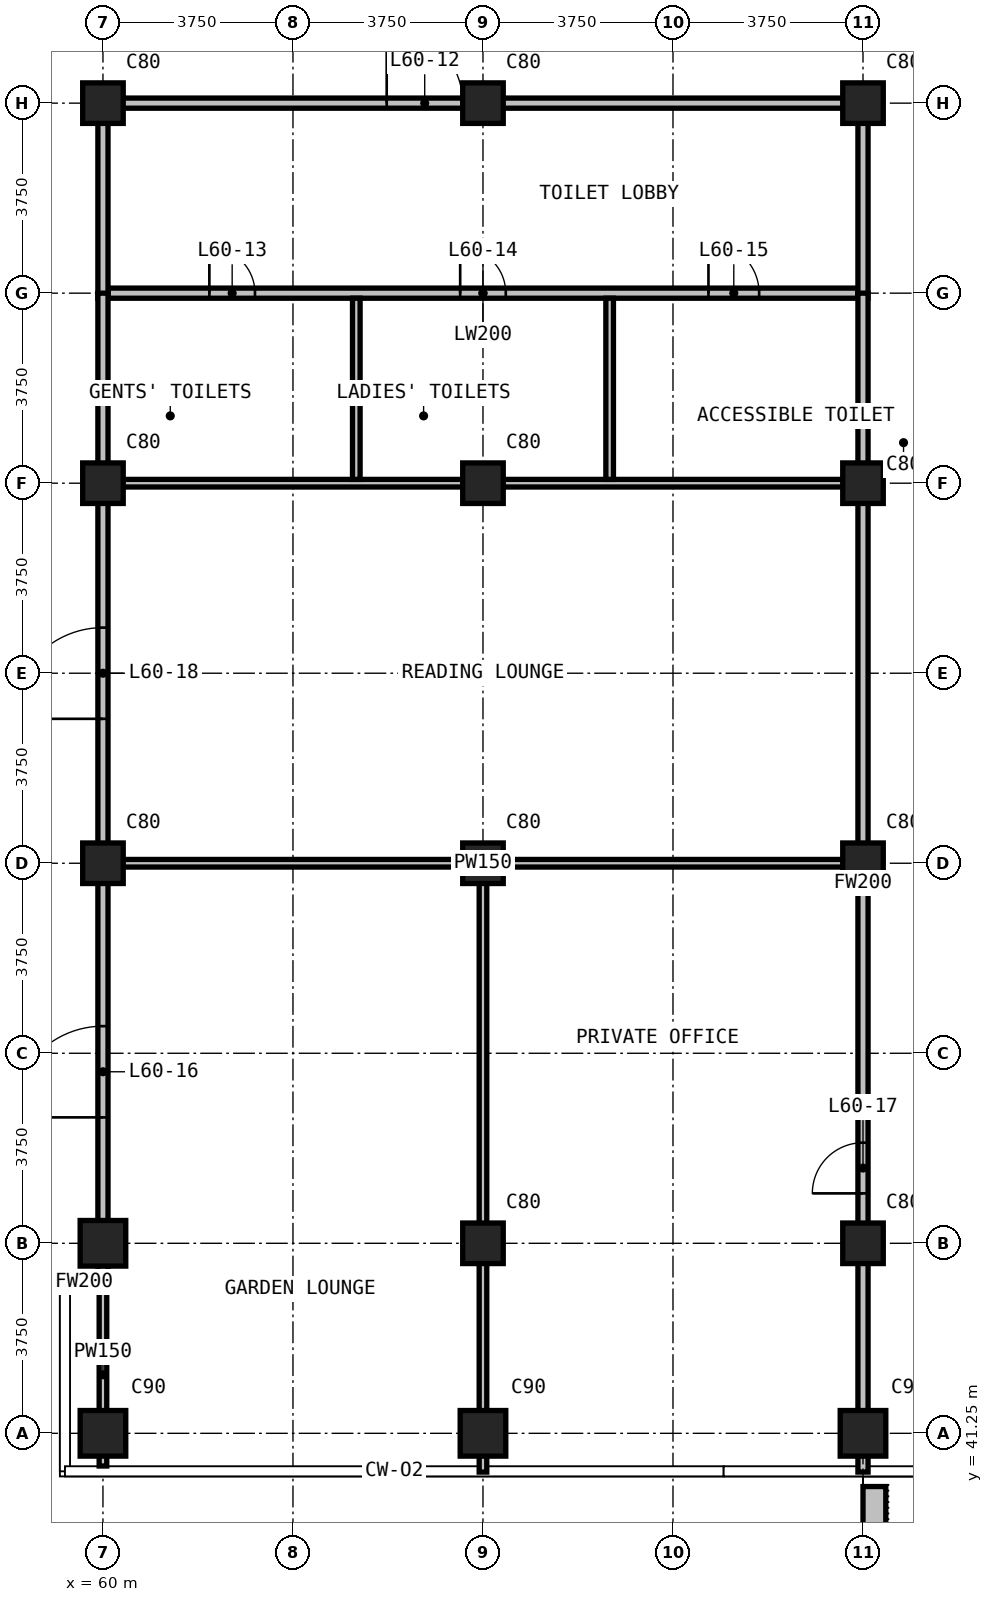
"""IFC4 building model, lengths in metres.
Left out: names, types, materials, properties, quantities, classifications, styles, units other than length and angle.
Written with IfcOpenShell. Run it as: python <this file> out.ifc"""

import sys

from ifc_helpers import new_model, si_unit, direction, frame, frame_2d, origin, origin_2d, place, context, subcontext, project, spatial, rectangle, extrude, element, fill, save


model = new_model("IFC4")
c1 = context("Model", 3, precision=1e-05, world=origin(), true_north=direction((0.0, 1.0)))
c2 = subcontext(c1, "Body", "Model", "MODEL_VIEW")
j1 = project(units=[si_unit("LENGTHUNIT", "METRE"), si_unit("PLANEANGLEUNIT", "RADIAN")], contexts=[c1])
p1 = place(None, origin())
s1 = spatial("IfcSite", under=j1, at=p1, CompositionType="ELEMENT")
p2 = place(p1, origin())
s2 = spatial("IfcBuilding", under=s1, at=p2, CompositionType="ELEMENT")
p3 = place(p2, frame((0.0, 0.0, 231.9)))
s3 = spatial("IfcBuildingStorey", under=s2, at=p3, CompositionType="ELEMENT", Elevation=231.9)
for number, where, z_axis, x_axis in (
    (1, (60.0, 41.25, 0.0), (0.0, 0.0, 1.0), (1.0, 0.0, 0.0)),
    (2, (60.0, 45.0, 0.0), (0.0, 0.0, 1.0), (1.0, 0.0, 0.0)),
):
    element("IfcColumn", number, at=place(p3, frame(where, z_axis=z_axis, x_axis=x_axis)), inside=s3, PredefinedType="COLUMN", context=c2, shape_type="SweptSolid", body=[
        extrude(rectangle(XDim=0.9, YDim=0.9, at=origin_2d()), origin(), (0.0, 0.0, 1.0), 3.6),
    ])
for number, where, z_axis, x_axis in (
    (3, (60.0, 52.5, 0.0), (0.0, 0.0, 1.0), (1.0, 0.0, 0.0)),
    (4, (60.0, 60.0, 0.0), (0.0, 0.0, 1.0), (1.0, 0.0, 0.0)),
    (5, (60.0, 67.5, 0.0), (0.0, 0.0, 1.0), (1.0, 0.0, 0.0)),
):
    element("IfcColumn", number, at=place(p3, frame(where, z_axis=z_axis, x_axis=x_axis)), inside=s3, PredefinedType="COLUMN", context=c2, shape_type="SweptSolid", body=[
        extrude(rectangle(XDim=0.8, YDim=0.8, at=origin_2d()), origin(), (0.0, 0.0, 1.0), 3.6),
    ])
p4 = place(p3, frame((67.5, 41.25, 0.0), z_axis=(0.0, 0.0, 1.0), x_axis=(1.0, 0.0, 0.0)))
e6 = element("IfcColumn", 6, at=p4, inside=s3, PredefinedType="COLUMN", context=c2, shape_type="SweptSolid", body=[
    extrude(rectangle(XDim=0.9, YDim=0.9, at=origin_2d()), origin(), (0.0, 0.0, 1.0), 3.6),
])
for number, where, z_axis, x_axis in (
    (7, (67.5, 45.0, 0.0), (0.0, 0.0, 1.0), (1.0, 0.0, 0.0)),
    (8, (67.5, 52.5, 0.0), (0.0, 0.0, 1.0), (1.0, 0.0, 0.0)),
    (9, (67.5, 60.0, 0.0), (0.0, 0.0, 1.0), (1.0, 0.0, 0.0)),
    (10, (67.5, 67.5, 0.0), (0.0, 0.0, 1.0), (1.0, 0.0, 0.0)),
):
    element("IfcColumn", number, at=place(p3, frame(where, z_axis=z_axis, x_axis=x_axis)), inside=s3, PredefinedType="COLUMN", context=c2, shape_type="SweptSolid", body=[
        extrude(rectangle(XDim=0.8, YDim=0.8, at=origin_2d()), origin(), (0.0, 0.0, 1.0), 3.6),
    ])
p5 = place(p3, frame((75.0, 41.25, 0.0), z_axis=(0.0, 0.0, 1.0), x_axis=(1.0, 0.0, 0.0)))
e11 = element("IfcColumn", 11, at=p5, inside=s3, PredefinedType="COLUMN", context=c2, shape_type="SweptSolid", body=[
    extrude(rectangle(XDim=0.9, YDim=0.9, at=origin_2d()), origin(), (0.0, 0.0, 1.0), 3.6),
])
for number, where, z_axis, x_axis in (
    (12, (75.0, 45.0, 0.0), (0.0, 0.0, 1.0), (1.0, 0.0, 0.0)),
    (13, (75.0, 52.5, 0.0), (0.0, 0.0, 1.0), (1.0, 0.0, 0.0)),
    (14, (75.0, 60.0, 0.0), (0.0, 0.0, 1.0), (1.0, 0.0, 0.0)),
    (15, (75.0, 67.5, 0.0), (0.0, 0.0, 1.0), (1.0, 0.0, 0.0)),
):
    element("IfcColumn", number, at=place(p3, frame(where, z_axis=z_axis, x_axis=x_axis)), inside=s3, PredefinedType="COLUMN", context=c2, shape_type="SweptSolid", body=[
        extrude(rectangle(XDim=0.8, YDim=0.8, at=origin_2d()), origin(), (0.0, 0.0, 1.0), 3.6),
    ])
p6 = place(p3, frame((75.225, 40.2, 0.0), z_axis=(0.0, 0.0, 1.0), x_axis=(0.0, -1.0, 0.0)))
e16 = element("IfcWall", 16, at=p6, inside=s3, PredefinedType="USERDEFINED", context=c2, shape_type="SweptSolid", body=[
    extrude(rectangle(XDim=2.35, YDim=0.45, at=frame_2d((1.175, 0.0))), origin(), (0.0, 0.0, 1.0), 1.1),
])
p7 = place(p3, frame((60.1, 63.75, 0.0), z_axis=(0.0, 0.0, 1.0), x_axis=(1.0, 0.0, 0.0)))
e17 = element("IfcWall", 17, at=p7, inside=s3, PredefinedType="PARTITIONING", context=c2, shape_type="SweptSolid", body=[
    extrude(rectangle(XDim=14.8, YDim=0.2, at=frame_2d((7.4, 0.0))), origin(), (0.0, 0.0, 1.0), 3.3),
])
p8 = place(p7, frame((2.0, 0.0, 0.0)))
e18 = element("IfcOpeningElement", 18, at=p8, cuts=e17, PredefinedType="OPENING", context=c2, shape_type="SweptSolid", body=[
    extrude(rectangle(XDim=0.9, YDim=2.2, at=frame_2d((0.45, 1.1))), frame((0.0, 0.11, 0.0), z_axis=(0.0, -1.0, 0.0), x_axis=(1.0, 0.0, 0.0)), (0.0, 0.0, 1.0), 0.22),
])
p9 = place(p7, frame((6.95, 0.0, 0.0)))
e19 = element("IfcOpeningElement", 19, at=p9, cuts=e17, PredefinedType="OPENING", context=c2, shape_type="SweptSolid", body=[
    extrude(rectangle(XDim=0.9, YDim=2.2, at=frame_2d((0.45, 1.1))), frame((0.0, 0.11, 0.0), z_axis=(0.0, -1.0, 0.0), x_axis=(1.0, 0.0, 0.0)), (0.0, 0.0, 1.0), 0.22),
])
p10 = place(p7, frame((11.85, 0.0, 0.0)))
e20 = element("IfcOpeningElement", 20, at=p10, cuts=e17, PredefinedType="OPENING", context=c2, shape_type="SweptSolid", body=[
    extrude(rectangle(XDim=1.0, YDim=2.2, at=frame_2d((0.5, 1.1))), frame((0.0, 0.11, 0.0), z_axis=(0.0, -1.0, 0.0), x_axis=(1.0, 0.0, 0.0)), (0.0, 0.0, 1.0), 0.22),
])
p11 = place(p3, frame((60.1, 67.5, 0.0), z_axis=(0.0, 0.0, 1.0), x_axis=(1.0, 0.0, 0.0)))
e21 = element("IfcWall", 21, at=p11, inside=s3, PredefinedType="PARTITIONING", context=c2, shape_type="SweptSolid", body=[
    extrude(rectangle(XDim=14.8, YDim=0.2, at=frame_2d((7.4, 0.0))), origin(), (0.0, 0.0, 1.0), 3.3),
])
p12 = place(p11, frame((5.5, 0.0, 0.0)))
e22 = element("IfcOpeningElement", 22, at=p12, cuts=e21, PredefinedType="OPENING", context=c2, shape_type="SweptSolid", body=[
    extrude(rectangle(XDim=1.5, YDim=2.2, at=frame_2d((0.75, 1.1))), frame((0.0, 0.11, 0.0), z_axis=(0.0, -1.0, 0.0), x_axis=(1.0, 0.0, 0.0)), (0.0, 0.0, 1.0), 0.22),
])
for number, where, z_axis, x_axis in (
    (23, (60.0, 63.65, 0.0), (0.0, 0.0, 1.0), (0.0, 1.0, 0.0)),
    (24, (75.0, 63.65, 0.0), (0.0, 0.0, 1.0), (0.0, 1.0, 0.0)),
):
    element("IfcWall", number, at=place(p3, frame(where, z_axis=z_axis, x_axis=x_axis)), inside=s3, PredefinedType="PARTITIONING", context=c2, shape_type="SweptSolid", body=[
        extrude(rectangle(XDim=3.95, YDim=0.2, at=frame_2d((1.975, 0.0))), origin(), (0.0, 0.0, 1.0), 3.3),
    ])
p13 = place(p3, frame((59.355, 44.235, 0.0), z_axis=(0.0, 0.0, 1.0), x_axis=(1.0, 0.0, 0.0)))
e25 = element("IfcWall", 25, at=p13, inside=s3, PredefinedType="PARTITIONING", context=c2, shape_type="SweptSolid", body=[
    extrude(rectangle(XDim=0.545, YDim=0.2, at=frame_2d((0.272, 0.0))), origin(), (0.0, 0.0, 1.0), 3.3),
])
p14 = place(p3, frame((60.0, 44.135, 0.0), z_axis=(0.0, 0.0, 1.0), x_axis=(0.0, 1.0, 0.0)))
e26 = element("IfcWall", 26, at=p14, inside=s3, PredefinedType="PARTITIONING", context=c2, shape_type="SweptSolid", body=[
    extrude(rectangle(XDim=19.615, YDim=0.2, at=frame_2d((9.808, 0.0))), origin(), (0.0, 0.0, 1.0), 3.3),
])
p15 = place(p14, frame((3.35, 0.0, 0.0)))
e27 = element("IfcOpeningElement", 27, at=p15, cuts=e26, PredefinedType="OPENING", context=c2, shape_type="SweptSolid", body=[
    extrude(rectangle(XDim=1.8, YDim=2.2, at=frame_2d((0.9, 1.1))), frame((0.0, 0.11, 0.0), z_axis=(0.0, -1.0, 0.0), x_axis=(1.0, 0.0, 0.0)), (0.0, 0.0, 1.0), 0.22),
])
p16 = place(p14, frame((11.215, 0.0, 0.0)))
e28 = element("IfcOpeningElement", 28, at=p16, cuts=e26, PredefinedType="OPENING", context=c2, shape_type="SweptSolid", body=[
    extrude(rectangle(XDim=1.8, YDim=2.2, at=frame_2d((0.9, 1.1))), frame((0.0, 0.11, 0.0), z_axis=(0.0, -1.0, 0.0), x_axis=(1.0, 0.0, 0.0)), (0.0, 0.0, 1.0), 0.22),
])
p17 = place(p3, frame((75.0, 40.485, 0.0), z_axis=(0.0, 0.0, 1.0), x_axis=(0.0, 1.0, 0.0)))
e29 = element("IfcWall", 29, at=p17, inside=s3, PredefinedType="PARTITIONING", context=c2, shape_type="SweptSolid", body=[
    extrude(rectangle(XDim=23.265, YDim=0.2, at=frame_2d((11.632, 0.0))), origin(), (0.0, 0.0, 1.0), 3.3),
])
p18 = place(p17, frame((5.5, 0.0, 0.0)))
e30 = element("IfcOpeningElement", 30, at=p18, cuts=e29, PredefinedType="OPENING", context=c2, shape_type="SweptSolid", body=[
    extrude(rectangle(XDim=1.0, YDim=2.2, at=frame_2d((0.5, 1.1))), frame((0.0, 0.11, 0.0), z_axis=(0.0, -1.0, 0.0), x_axis=(1.0, 0.0, 0.0)), (0.0, 0.0, 1.0), 0.22),
])
for number, where, z_axis, x_axis in (
    (31, (60.1, 52.5, 0.0), (0.0, 0.0, 1.0), (1.0, 0.0, 0.0)),
    (32, (60.1, 60.0, 0.0), (0.0, 0.0, 1.0), (1.0, 0.0, 0.0)),
):
    element("IfcWall", number, at=place(p3, frame(where, z_axis=z_axis, x_axis=x_axis)), inside=s3, PredefinedType="PARTITIONING", context=c2, shape_type="SweptSolid", body=[
        extrude(rectangle(XDim=14.8, YDim=0.15, at=frame_2d((7.4, 0.0))), origin(), (0.0, 0.0, 1.0), 3.3),
    ])
p19 = place(p3, frame((60.0, 40.605, 0.0), z_axis=(0.0, 0.0, 1.0), x_axis=(0.0, 1.0, 0.0)))
e33 = element("IfcWall", 33, at=p19, inside=s3, PredefinedType="PARTITIONING", context=c2, shape_type="SweptSolid", body=[
    extrude(rectangle(XDim=3.6, YDim=0.15, at=frame_2d((1.8, 0.0))), origin(), (0.0, 0.0, 1.0), 3.3),
])
p20 = place(p3, frame((65.0, 60.075, 0.0), z_axis=(0.0, 0.0, 1.0), x_axis=(0.0, 1.0, 0.0)))
e34 = element("IfcWall", 34, at=p20, inside=s3, PredefinedType="PARTITIONING", context=c2, shape_type="SweptSolid", body=[
    extrude(rectangle(XDim=3.575, YDim=0.15, at=frame_2d((1.788, 0.0))), origin(), (0.0, 0.0, 1.0), 3.3),
])
p21 = place(p3, frame((67.5, 40.485, 0.0), z_axis=(0.0, 0.0, 1.0), x_axis=(0.0, 1.0, 0.0)))
e35 = element("IfcWall", 35, at=p21, inside=s3, PredefinedType="PARTITIONING", context=c2, shape_type="SweptSolid", body=[
    extrude(rectangle(XDim=11.94, YDim=0.15, at=frame_2d((5.97, 0.0))), origin(), (0.0, 0.0, 1.0), 3.3),
])
p22 = place(p3, frame((70.0, 60.075, 0.0), z_axis=(0.0, 0.0, 1.0), x_axis=(0.0, 1.0, 0.0)))
e36 = element("IfcWall", 36, at=p22, inside=s3, PredefinedType="PARTITIONING", context=c2, shape_type="SweptSolid", body=[
    extrude(rectangle(XDim=3.575, YDim=0.15, at=frame_2d((1.788, 0.0))), origin(), (0.0, 0.0, 1.0), 3.3),
])
p23 = place(p12, origin())
e37 = element("IfcDoor", 37, at=p23, inside=s3, OperationType="DOUBLE_DOOR_SINGLE_SWING", PredefinedType="DOOR", context=c2, shape_type="SweptSolid", body=[
    extrude(rectangle(XDim=1.5, YDim=2.2, at=frame_2d((0.75, 1.1))), frame((0.0, 0.025, 0.0), z_axis=(0.0, -1.0, 0.0), x_axis=(1.0, 0.0, 0.0)), (0.0, 0.0, 1.0), 0.05),
])
fill(e22, e37)
p24 = place(p8, origin())
e38 = element("IfcDoor", 38, at=p24, inside=s3, OperationType="SINGLE_SWING_LEFT", PredefinedType="DOOR", context=c2, shape_type="SweptSolid", body=[
    extrude(rectangle(XDim=0.9, YDim=2.2, at=frame_2d((0.45, 1.1))), frame((0.0, 0.025, 0.0), z_axis=(0.0, -1.0, 0.0), x_axis=(1.0, 0.0, 0.0)), (0.0, 0.0, 1.0), 0.05),
])
fill(e18, e38)
p25 = place(p9, origin())
e39 = element("IfcDoor", 39, at=p25, inside=s3, OperationType="SINGLE_SWING_LEFT", PredefinedType="DOOR", context=c2, shape_type="SweptSolid", body=[
    extrude(rectangle(XDim=0.9, YDim=2.2, at=frame_2d((0.45, 1.1))), frame((0.0, 0.025, 0.0), z_axis=(0.0, -1.0, 0.0), x_axis=(1.0, 0.0, 0.0)), (0.0, 0.0, 1.0), 0.05),
])
fill(e19, e39)
p26 = place(p10, origin())
e40 = element("IfcDoor", 40, at=p26, inside=s3, OperationType="SINGLE_SWING_LEFT", PredefinedType="DOOR", context=c2, shape_type="SweptSolid", body=[
    extrude(rectangle(XDim=1.0, YDim=2.2, at=frame_2d((0.5, 1.1))), frame((0.0, 0.025, 0.0), z_axis=(0.0, -1.0, 0.0), x_axis=(1.0, 0.0, 0.0)), (0.0, 0.0, 1.0), 0.05),
])
fill(e20, e40)
p27 = place(p15, origin())
e41 = element("IfcDoor", 41, at=p27, inside=s3, OperationType="DOUBLE_DOOR_SINGLE_SWING", PredefinedType="DOOR", context=c2, shape_type="SweptSolid", body=[
    extrude(rectangle(XDim=1.8, YDim=2.2, at=frame_2d((0.9, 1.1))), frame((0.0, 0.025, 0.0), z_axis=(0.0, -1.0, 0.0), x_axis=(1.0, 0.0, 0.0)), (0.0, 0.0, 1.0), 0.05),
])
fill(e27, e41)
p28 = place(p18, origin())
e42 = element("IfcDoor", 42, at=p28, inside=s3, OperationType="SINGLE_SWING_LEFT", PredefinedType="DOOR", context=c2, shape_type="SweptSolid", body=[
    extrude(rectangle(XDim=1.0, YDim=2.2, at=frame_2d((0.5, 1.1))), frame((0.0, 0.025, 0.0), z_axis=(0.0, -1.0, 0.0), x_axis=(1.0, 0.0, 0.0)), (0.0, 0.0, 1.0), 0.05),
])
fill(e30, e42)
p29 = place(p16, origin())
e43 = element("IfcDoor", 43, at=p29, inside=s3, OperationType="DOUBLE_DOOR_SINGLE_SWING", PredefinedType="DOOR", context=c2, shape_type="SweptSolid", body=[
    extrude(rectangle(XDim=1.8, YDim=2.2, at=frame_2d((0.9, 1.1))), frame((0.0, 0.025, 0.0), z_axis=(0.0, -1.0, 0.0), x_axis=(1.0, 0.0, 0.0)), (0.0, 0.0, 1.0), 0.05),
])
fill(e28, e43)
save(model, sys.argv[1])
